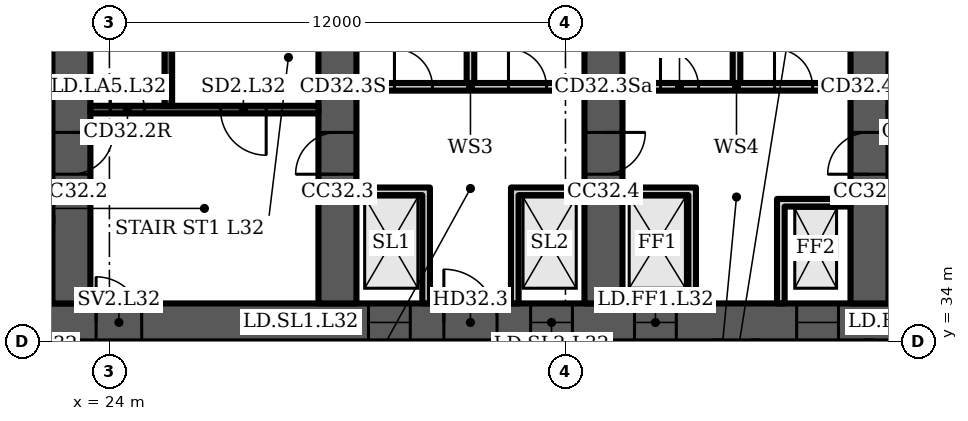
"""IFC4 building model, lengths in metres.
Left out: names, types, materials, properties, quantities, classifications, styles, units other than length and angle.
Written with IfcOpenShell. Run it as: python <this file> out.ifc"""

import sys

from ifc_helpers import new_model, si_unit, direction, frame, frame_2d, origin, place, context, subcontext, project, spatial, polyline, rectangle, outline, extrude, element, fill, save


model = new_model("IFC4")
c1 = context("Model", 3, precision=1e-05, world=origin(), true_north=direction((0.0, 1.0)))
c2 = subcontext(c1, "Body", "Model", "MODEL_VIEW")
j1 = project(units=[si_unit("LENGTHUNIT", "METRE"), si_unit("PLANEANGLEUNIT", "RADIAN")], contexts=[c1])
p1 = place(None, origin())
s1 = spatial("IfcSite", under=j1, at=p1, CompositionType="ELEMENT")
p2 = place(p1, origin())
s2 = spatial("IfcBuilding", under=s1, at=p2, CompositionType="ELEMENT")
p3 = place(p2, frame((0.0, 0.0, 136.3)))
s3 = spatial("IfcBuildingStorey", under=s2, at=p3, CompositionType="ELEMENT", Elevation=136.3)
p4 = place(p3, frame((16.0, 34.5, 0.0), z_axis=(0.0, 0.0, 1.0), x_axis=(1.0, 0.0, 0.0)))
e1 = element("IfcWall", 1, at=p4, inside=s3, PredefinedType="SHEAR", context=c2, shape_type="SweptSolid", body=[
    extrude(rectangle(XDim=49.0, YDim=1.0, at=frame_2d((24.5, 0.0))), origin(), (0.0, 0.0, 1.0), 3.6),
])
p5 = place(p4, frame((1.2, 0.0, 0.0)))
e2 = element("IfcOpeningElement", 2, at=p5, cuts=e1, PredefinedType="OPENING", context=c2, shape_type="SweptSolid", body=[
    extrude(rectangle(XDim=1.1, YDim=2.1, at=frame_2d((0.55, 1.05))), frame((0.0, 0.51, 0.0), z_axis=(0.0, -1.0, 0.0), x_axis=(1.0, 0.0, 0.0)), (0.0, 0.0, 1.0), 1.02),
])
p6 = place(p4, frame((5.083, 0.0, 0.0)))
e3 = element("IfcOpeningElement", 3, at=p6, cuts=e1, PredefinedType="OPENING", context=c2, shape_type="SweptSolid", body=[
    extrude(rectangle(XDim=1.1, YDim=2.1, at=frame_2d((0.55, 1.05))), frame((0.0, 0.51, 0.0), z_axis=(0.0, -1.0, 0.0), x_axis=(1.0, 0.0, 0.0)), (0.0, 0.0, 1.0), 1.02),
])
p7 = place(p4, frame((2.933, 0.0, 0.0)))
e4 = element("IfcOpeningElement", 4, at=p7, cuts=e1, PredefinedType="OPENING", context=c2, shape_type="SweptSolid", body=[
    extrude(rectangle(XDim=1.4, YDim=2.1, at=frame_2d((0.7, 1.05))), frame((0.0, 0.51, 0.0), z_axis=(0.0, -1.0, 0.0), x_axis=(1.0, 0.0, 0.0)), (0.0, 0.0, 1.0), 1.02),
])
p8 = place(p4, frame((7.65, 0.0, 0.0)))
e5 = element("IfcOpeningElement", 5, at=p8, cuts=e1, PredefinedType="OPENING", context=c2, shape_type="SweptSolid", body=[
    extrude(rectangle(XDim=1.2, YDim=2.1, at=frame_2d((0.6, 1.05))), frame((0.0, 0.51, 0.0), z_axis=(0.0, -1.0, 0.0), x_axis=(1.0, 0.0, 0.0)), (0.0, 0.0, 1.0), 1.02),
])
p9 = place(p4, frame((14.817, 0.0, 0.0)))
e6 = element("IfcOpeningElement", 6, at=p9, cuts=e1, PredefinedType="OPENING", context=c2, shape_type="SweptSolid", body=[
    extrude(rectangle(XDim=1.1, YDim=2.1, at=frame_2d((0.55, 1.05))), frame((0.0, 0.51, 0.0), z_axis=(0.0, -1.0, 0.0), x_axis=(1.0, 0.0, 0.0)), (0.0, 0.0, 1.0), 1.02),
])
p10 = place(p4, frame((19.083, 0.0, 0.0)))
e7 = element("IfcOpeningElement", 7, at=p10, cuts=e1, PredefinedType="OPENING", context=c2, shape_type="SweptSolid", body=[
    extrude(rectangle(XDim=1.1, YDim=2.1, at=frame_2d((0.55, 1.05))), frame((0.0, 0.51, 0.0), z_axis=(0.0, -1.0, 0.0), x_axis=(1.0, 0.0, 0.0)), (0.0, 0.0, 1.0), 1.02),
])
p11 = place(p4, frame((16.8, 0.0, 0.0)))
e8 = element("IfcOpeningElement", 8, at=p11, cuts=e1, PredefinedType="OPENING", context=c2, shape_type="SweptSolid", body=[
    extrude(rectangle(XDim=1.4, YDim=2.1, at=frame_2d((0.7, 1.05))), frame((0.0, 0.51, 0.0), z_axis=(0.0, -1.0, 0.0), x_axis=(1.0, 0.0, 0.0)), (0.0, 0.0, 1.0), 1.02),
])
p12 = place(p4, frame((21.817, 0.0, 0.0)))
e9 = element("IfcOpeningElement", 9, at=p12, cuts=e1, PredefinedType="OPENING", context=c2, shape_type="SweptSolid", body=[
    extrude(rectangle(XDim=1.1, YDim=2.1, at=frame_2d((0.55, 1.05))), frame((0.0, 0.51, 0.0), z_axis=(0.0, -1.0, 0.0), x_axis=(1.0, 0.0, 0.0)), (0.0, 0.0, 1.0), 1.02),
])
p13 = place(p4, frame((26.083, 0.0, 0.0)))
e10 = element("IfcOpeningElement", 10, at=p13, cuts=e1, PredefinedType="OPENING", context=c2, shape_type="SweptSolid", body=[
    extrude(rectangle(XDim=1.1, YDim=2.1, at=frame_2d((0.55, 1.05))), frame((0.0, 0.51, 0.0), z_axis=(0.0, -1.0, 0.0), x_axis=(1.0, 0.0, 0.0)), (0.0, 0.0, 1.0), 1.02),
])
p14 = place(p4, frame((33.15, 0.0, 0.0)))
e11 = element("IfcOpeningElement", 11, at=p14, cuts=e1, PredefinedType="OPENING", context=c2, shape_type="SweptSolid", body=[
    extrude(rectangle(XDim=1.2, YDim=2.1, at=frame_2d((0.6, 1.05))), frame((0.0, 0.51, 0.0), z_axis=(0.0, -1.0, 0.0), x_axis=(1.0, 0.0, 0.0)), (0.0, 0.0, 1.0), 1.02),
])
p15 = place(p4, frame((37.8, 0.0, 0.0)))
e12 = element("IfcOpeningElement", 12, at=p15, cuts=e1, PredefinedType="OPENING", context=c2, shape_type="SweptSolid", body=[
    extrude(rectangle(XDim=1.4, YDim=2.1, at=frame_2d((0.7, 1.05))), frame((0.0, 0.51, 0.0), z_axis=(0.0, -1.0, 0.0), x_axis=(1.0, 0.0, 0.0)), (0.0, 0.0, 1.0), 1.02),
])
p16 = place(p4, frame((42.817, 0.0, 0.0)))
e13 = element("IfcOpeningElement", 13, at=p16, cuts=e1, PredefinedType="OPENING", context=c2, shape_type="SweptSolid", body=[
    extrude(rectangle(XDim=1.1, YDim=2.1, at=frame_2d((0.55, 1.05))), frame((0.0, 0.51, 0.0), z_axis=(0.0, -1.0, 0.0), x_axis=(1.0, 0.0, 0.0)), (0.0, 0.0, 1.0), 1.02),
])
p17 = place(p4, frame((46.7, 0.0, 0.0)))
e14 = element("IfcOpeningElement", 14, at=p17, cuts=e1, PredefinedType="OPENING", context=c2, shape_type="SweptSolid", body=[
    extrude(rectangle(XDim=1.1, YDim=2.1, at=frame_2d((0.55, 1.05))), frame((0.0, 0.51, 0.0), z_axis=(0.0, -1.0, 0.0), x_axis=(1.0, 0.0, 0.0)), (0.0, 0.0, 1.0), 1.02),
])
p18 = place(p4, frame((44.667, 0.0, 0.0)))
e15 = element("IfcOpeningElement", 15, at=p18, cuts=e1, PredefinedType="OPENING", context=c2, shape_type="SweptSolid", body=[
    extrude(rectangle(XDim=1.4, YDim=2.1, at=frame_2d((0.7, 1.05))), frame((0.0, 0.51, 0.0), z_axis=(0.0, -1.0, 0.0), x_axis=(1.0, 0.0, 0.0)), (0.0, 0.0, 1.0), 1.02),
])
p19 = place(p3, frame((23.0, 35.0, 0.0), z_axis=(0.0, 0.0, 1.0), x_axis=(0.0, 1.0, 0.0)))
e16 = element("IfcWall", 16, at=p19, inside=s3, PredefinedType="SHEAR", context=c2, shape_type="SweptSolid", body=[
    extrude(rectangle(XDim=13.352, YDim=1.0, at=frame_2d((6.676, 0.0))), origin(), (0.0, 0.0, 1.0), 3.6),
])
p20 = place(p19, frame((10.426, 0.0, 0.0)))
e17 = element("IfcOpeningElement", 17, at=p20, cuts=e16, PredefinedType="OPENING", context=c2, shape_type="SweptSolid", body=[
    extrude(rectangle(XDim=1.0, YDim=2.1, at=frame_2d((0.5, 1.05))), frame((0.0, 0.51, 0.0), z_axis=(0.0, -1.0, 0.0), x_axis=(1.0, 0.0, 0.0)), (0.0, 0.0, 1.0), 1.02),
])
p21 = place(p19, frame((3.4, 0.0, 0.0)))
e18 = element("IfcOpeningElement", 18, at=p21, cuts=e16, PredefinedType="OPENING", context=c2, shape_type="SweptSolid", body=[
    extrude(rectangle(XDim=1.1, YDim=2.1, at=frame_2d((0.55, 1.05))), frame((0.0, 0.51, 0.0), z_axis=(0.0, -1.0, 0.0), x_axis=(1.0, 0.0, 0.0)), (0.0, 0.0, 1.0), 1.02),
])
p22 = place(p3, frame((30.0, 35.0, 0.0), z_axis=(0.0, 0.0, 1.0), x_axis=(0.0, 1.0, 0.0)))
e19 = element("IfcWall", 19, at=p22, inside=s3, PredefinedType="SHEAR", context=c2, shape_type="SweptSolid", body=[
    extrude(rectangle(XDim=13.965, YDim=1.0, at=frame_2d((6.982, 0.0))), origin(), (0.0, 0.0, 1.0), 3.6),
])
p23 = place(p22, frame((3.4, 0.0, 0.0)))
e20 = element("IfcOpeningElement", 20, at=p23, cuts=e19, PredefinedType="OPENING", context=c2, shape_type="SweptSolid", body=[
    extrude(rectangle(XDim=1.1, YDim=2.1, at=frame_2d((0.55, 1.05))), frame((0.0, 0.51, 0.0), z_axis=(0.0, -1.0, 0.0), x_axis=(1.0, 0.0, 0.0)), (0.0, 0.0, 1.0), 1.02),
])
p24 = place(p3, frame((37.0, 35.0, 0.0), z_axis=(0.0, 0.0, 1.0), x_axis=(0.0, 1.0, 0.0)))
e21 = element("IfcWall", 21, at=p24, inside=s3, PredefinedType="SHEAR", context=c2, shape_type="SweptSolid", body=[
    extrude(rectangle(XDim=14.577, YDim=1.0, at=frame_2d((7.289, 0.0))), origin(), (0.0, 0.0, 1.0), 3.6),
])
p25 = place(p24, frame((3.4, 0.0, 0.0)))
e22 = element("IfcOpeningElement", 22, at=p25, cuts=e21, PredefinedType="OPENING", context=c2, shape_type="SweptSolid", body=[
    extrude(rectangle(XDim=1.1, YDim=2.1, at=frame_2d((0.55, 1.05))), frame((0.0, 0.51, 0.0), z_axis=(0.0, -1.0, 0.0), x_axis=(1.0, 0.0, 0.0)), (0.0, 0.0, 1.0), 1.02),
])
p26 = place(p24, frame((9.8, 0.0, 0.0)))
e23 = element("IfcOpeningElement", 23, at=p26, cuts=e21, PredefinedType="OPENING", context=c2, shape_type="SweptSolid", body=[
    extrude(rectangle(XDim=1.0, YDim=2.1, at=frame_2d((0.5, 1.05))), frame((0.0, 0.51, 0.0), z_axis=(0.0, -1.0, 0.0), x_axis=(1.0, 0.0, 0.0)), (0.0, 0.0, 1.0), 1.02),
])
p27 = place(p3, frame((44.0, 35.0, 0.0), z_axis=(0.0, 0.0, 1.0), x_axis=(0.0, 1.0, 0.0)))
e24 = element("IfcWall", 24, at=p27, inside=s3, PredefinedType="SHEAR", context=c2, shape_type="SweptSolid", body=[
    extrude(rectangle(XDim=14.577, YDim=1.0, at=frame_2d((7.289, 0.0))), origin(), (0.0, 0.0, 1.0), 3.6),
])
p28 = place(p27, frame((3.4, 0.0, 0.0)))
e25 = element("IfcOpeningElement", 25, at=p28, cuts=e24, PredefinedType="OPENING", context=c2, shape_type="SweptSolid", body=[
    extrude(rectangle(XDim=1.1, YDim=2.1, at=frame_2d((0.55, 1.05))), frame((0.0, 0.51, 0.0), z_axis=(0.0, -1.0, 0.0), x_axis=(1.0, 0.0, 0.0)), (0.0, 0.0, 1.0), 1.02),
])
p29 = place(p27, frame((9.8, 0.0, 0.0)))
e26 = element("IfcOpeningElement", 26, at=p29, cuts=e24, PredefinedType="OPENING", context=c2, shape_type="SweptSolid", body=[
    extrude(rectangle(XDim=1.0, YDim=2.1, at=frame_2d((0.5, 1.05))), frame((0.0, 0.51, 0.0), z_axis=(0.0, -1.0, 0.0), x_axis=(1.0, 0.0, 0.0)), (0.0, 0.0, 1.0), 1.02),
])
p30 = place(p3, frame((23.5, 40.1, 0.0), z_axis=(0.0, 0.0, 1.0), x_axis=(1.0, 0.0, 0.0)))
e27 = element("IfcWall", 27, at=p30, inside=s3, PredefinedType="SHEAR", context=c2, shape_type="SweptSolid", body=[
    extrude(rectangle(XDim=6.0, YDim=0.2, at=frame_2d((3.0, 0.0))), origin(), (0.0, 0.0, 1.0), 3.2),
])
p31 = place(p30, frame((3.425, 0.0, 0.0)))
e28 = element("IfcOpeningElement", 28, at=p31, cuts=e27, PredefinedType="OPENING", context=c2, shape_type="SweptSolid", body=[
    extrude(rectangle(XDim=1.2, YDim=2.1, at=frame_2d((0.6, 1.05))), frame((0.0, 0.11, 0.0), z_axis=(0.0, -1.0, 0.0), x_axis=(1.0, 0.0, 0.0)), (0.0, 0.0, 1.0), 0.22),
])
p32 = place(p30, frame((0.525, 0.0, 0.0)))
e29 = element("IfcOpeningElement", 29, at=p32, cuts=e27, PredefinedType="OPENING", context=c2, shape_type="SweptSolid", body=[
    extrude(rectangle(XDim=0.9, YDim=2.1, at=frame_2d((0.45, 1.05))), frame((0.0, 0.11, 0.0), z_axis=(0.0, -1.0, 0.0), x_axis=(1.0, 0.0, 0.0)), (0.0, 0.0, 1.0), 0.22),
])
p33 = place(p3, frame((25.55, 40.2, 0.0), z_axis=(0.0, 0.0, 1.0), x_axis=(0.0, 1.0, 0.0)))
e30 = element("IfcWall", 30, at=p33, inside=s3, PredefinedType="SHEAR", context=c2, shape_type="SweptSolid", body=[
    extrude(rectangle(XDim=7.2, YDim=0.2, at=frame_2d((3.6, 0.0))), origin(), (0.0, 0.0, 1.0), 3.2),
])
p34 = place(p3, frame((30.5, 40.7, 0.0), z_axis=(0.0, 0.0, 1.0), x_axis=(1.0, 0.0, 0.0)))
e31 = element("IfcWall", 31, at=p34, inside=s3, PredefinedType="PARTITIONING", context=c2, shape_type="SweptSolid", body=[
    extrude(rectangle(XDim=6.0, YDim=0.2, at=frame_2d((3.0, 0.0))), origin(), (0.0, 0.0, 1.0), 3.2),
])
p35 = place(p34, frame((1.0, 0.0, 0.0)))
e32 = element("IfcOpeningElement", 32, at=p35, cuts=e31, PredefinedType="OPENING", context=c2, shape_type="SweptSolid", body=[
    extrude(rectangle(XDim=1.0, YDim=2.1, at=frame_2d((0.5, 1.05))), frame((0.0, 0.11, 0.0), z_axis=(0.0, -1.0, 0.0), x_axis=(1.0, 0.0, 0.0)), (0.0, 0.0, 1.0), 0.22),
])
p36 = place(p34, frame((4.0, 0.0, 0.0)))
e33 = element("IfcOpeningElement", 33, at=p36, cuts=e31, PredefinedType="OPENING", context=c2, shape_type="SweptSolid", body=[
    extrude(rectangle(XDim=1.0, YDim=2.1, at=frame_2d((0.5, 1.05))), frame((0.0, 0.11, 0.0), z_axis=(0.0, -1.0, 0.0), x_axis=(1.0, 0.0, 0.0)), (0.0, 0.0, 1.0), 0.22),
])
p37 = place(p3, frame((0.0, 0.0, -0.0)))
e34 = element("IfcWall", 34, at=p37, inside=s3, PredefinedType="PARTITIONING", context=c2, shape_type="SweptSolid", body=[
    extrude(outline(polyline([(32.233, 37.85), (30.5, 37.85), (30.5, 38.05), (32.233, 38.05), (32.433, 38.05), (32.433, 35.0), (32.233, 35.0), (32.233, 37.85)])), origin(), (0.0, 0.0, 1.0), 3.2),
])
p38 = place(p3, frame((0.0, 0.0, -0.0)))
e35 = element("IfcWall", 35, at=p38, inside=s3, PredefinedType="PARTITIONING", context=c2, shape_type="SweptSolid", body=[
    extrude(outline(polyline([(34.567, 38.05), (34.767, 38.05), (36.5, 38.05), (36.5, 37.85), (34.767, 37.85), (34.767, 35.0), (34.567, 35.0), (34.567, 38.05)])), origin(), (0.0, 0.0, 1.0), 3.2),
])
p39 = place(p3, frame((33.5, 40.8, 0.0), z_axis=(0.0, 0.0, 1.0), x_axis=(0.0, 1.0, 0.0)))
e36 = element("IfcWall", 36, at=p39, inside=s3, PredefinedType="PARTITIONING", context=c2, shape_type="SweptSolid", body=[
    extrude(rectangle(XDim=8.232, YDim=0.2, at=frame_2d((4.116, 0.0))), origin(), (0.0, 0.0, 1.0), 3.2),
])
p40 = place(p3, frame((37.5, 40.7, 0.0), z_axis=(0.0, 0.0, 1.0), x_axis=(1.0, 0.0, 0.0)))
e37 = element("IfcWall", 37, at=p40, inside=s3, PredefinedType="PARTITIONING", context=c2, shape_type="SweptSolid", body=[
    extrude(rectangle(XDim=6.0, YDim=0.2, at=frame_2d((3.0, 0.0))), origin(), (0.0, 0.0, 1.0), 3.2),
])
p41 = place(p40, frame((1.0, 0.0, 0.0)))
e38 = element("IfcOpeningElement", 38, at=p41, cuts=e37, PredefinedType="OPENING", context=c2, shape_type="SweptSolid", body=[
    extrude(rectangle(XDim=1.0, YDim=2.1, at=frame_2d((0.5, 1.05))), frame((0.0, 0.11, 0.0), z_axis=(0.0, -1.0, 0.0), x_axis=(1.0, 0.0, 0.0)), (0.0, 0.0, 1.0), 0.22),
])
p42 = place(p40, frame((4.0, 0.0, 0.0)))
e39 = element("IfcOpeningElement", 39, at=p42, cuts=e37, PredefinedType="OPENING", context=c2, shape_type="SweptSolid", body=[
    extrude(rectangle(XDim=1.0, YDim=2.1, at=frame_2d((0.5, 1.05))), frame((0.0, 0.11, 0.0), z_axis=(0.0, -1.0, 0.0), x_axis=(1.0, 0.0, 0.0)), (0.0, 0.0, 1.0), 0.22),
])
p43 = place(p3, frame((0.0, 0.0, -0.0)))
e40 = element("IfcWall", 40, at=p43, inside=s3, PredefinedType="PARTITIONING", context=c2, shape_type="SweptSolid", body=[
    extrude(outline(polyline([(41.567, 37.75), (41.767, 37.75), (43.5, 37.75), (43.5, 37.55), (41.767, 37.55), (41.767, 35.0), (41.567, 35.0), (41.567, 37.75)])), origin(), (0.0, 0.0, 1.0), 3.2),
])
p44 = place(p3, frame((0.0, 0.0, -0.0)))
e41 = element("IfcWall", 41, at=p44, inside=s3, PredefinedType="PARTITIONING", context=c2, shape_type="SweptSolid", body=[
    extrude(outline(polyline([(39.233, 37.85), (37.5, 37.85), (37.5, 38.05), (39.233, 38.05), (39.433, 38.05), (39.433, 35.0), (39.233, 35.0), (39.233, 37.85)])), origin(), (0.0, 0.0, 1.0), 3.2),
])
p45 = place(p3, frame((40.5, 40.8, 0.0), z_axis=(0.0, 0.0, 1.0), x_axis=(0.0, 1.0, 0.0)))
e42 = element("IfcWall", 42, at=p45, inside=s3, PredefinedType="PARTITIONING", context=c2, shape_type="SweptSolid", body=[
    extrude(rectangle(XDim=8.844, YDim=0.2, at=frame_2d((4.422, 0.0))), origin(), (0.0, 0.0, 1.0), 3.2),
])
p46 = place(p31, origin())
e43 = element("IfcDoor", 43, at=p46, inside=s3, OperationType="SINGLE_SWING_RIGHT", PredefinedType="DOOR", context=c2, shape_type="SweptSolid", body=[
    extrude(rectangle(XDim=1.2, YDim=2.1, at=frame_2d((0.6, 1.05))), frame((0.0, 0.025, 0.0), z_axis=(0.0, -1.0, 0.0), x_axis=(1.0, 0.0, 0.0)), (0.0, 0.0, 1.0), 0.05),
])
fill(e28, e43)
p47 = place(p32, origin())
e44 = element("IfcDoor", 44, at=p47, inside=s3, OperationType="SINGLE_SWING_LEFT", PredefinedType="DOOR", context=c2, shape_type="SweptSolid", body=[
    extrude(rectangle(XDim=0.9, YDim=2.1, at=frame_2d((0.45, 1.05))), frame((0.0, 0.025, 0.0), z_axis=(0.0, -1.0, 0.0), x_axis=(1.0, 0.0, 0.0)), (0.0, 0.0, 1.0), 0.05),
])
fill(e29, e44)
p48 = place(p8, origin())
e45 = element("IfcDoor", 45, at=p48, inside=s3, OperationType="SINGLE_SWING_LEFT", PredefinedType="DOOR", context=c2, shape_type="SweptSolid", body=[
    extrude(rectangle(XDim=1.2, YDim=2.1, at=frame_2d((0.6, 1.05))), frame((0.0, 0.025, 0.0), z_axis=(0.0, -1.0, 0.0), x_axis=(1.0, 0.0, 0.0)), (0.0, 0.0, 1.0), 0.05),
])
fill(e5, e45)
p49 = place(p9, origin())
e46 = element("IfcDoor", 46, at=p49, inside=s3, OperationType="DOUBLE_DOOR_SLIDING", PredefinedType="DOOR", context=c2, shape_type="SweptSolid", body=[
    extrude(rectangle(XDim=1.1, YDim=2.1, at=frame_2d((0.55, 1.05))), frame((0.0, 0.025, 0.0), z_axis=(0.0, -1.0, 0.0), x_axis=(1.0, 0.0, 0.0)), (0.0, 0.0, 1.0), 0.05),
])
fill(e6, e46)
p50 = place(p10, origin())
e47 = element("IfcDoor", 47, at=p50, inside=s3, OperationType="DOUBLE_DOOR_SLIDING", PredefinedType="DOOR", context=c2, shape_type="SweptSolid", body=[
    extrude(rectangle(XDim=1.1, YDim=2.1, at=frame_2d((0.55, 1.05))), frame((0.0, 0.025, 0.0), z_axis=(0.0, -1.0, 0.0), x_axis=(1.0, 0.0, 0.0)), (0.0, 0.0, 1.0), 0.05),
])
fill(e7, e47)
p51 = place(p11, origin())
e48 = element("IfcDoor", 48, at=p51, inside=s3, OperationType="DOUBLE_DOOR_SINGLE_SWING", PredefinedType="DOOR", context=c2, shape_type="SweptSolid", body=[
    extrude(rectangle(XDim=1.4, YDim=2.1, at=frame_2d((0.7, 1.05))), frame((0.0, 0.025, 0.0), z_axis=(0.0, -1.0, 0.0), x_axis=(1.0, 0.0, 0.0)), (0.0, 0.0, 1.0), 0.05),
])
fill(e8, e48)
p52 = place(p35, origin())
e49 = element("IfcDoor", 49, at=p52, inside=s3, OperationType="SINGLE_SWING_LEFT", PredefinedType="DOOR", context=c2, shape_type="SweptSolid", body=[
    extrude(rectangle(XDim=1.0, YDim=2.1, at=frame_2d((0.5, 1.05))), frame((0.0, 0.025, 0.0), z_axis=(0.0, -1.0, 0.0), x_axis=(1.0, 0.0, 0.0)), (0.0, 0.0, 1.0), 0.05),
])
fill(e32, e49)
p53 = place(p36, origin())
e50 = element("IfcDoor", 50, at=p53, inside=s3, OperationType="SINGLE_SWING_LEFT", PredefinedType="DOOR", context=c2, shape_type="SweptSolid", body=[
    extrude(rectangle(XDim=1.0, YDim=2.1, at=frame_2d((0.5, 1.05))), frame((0.0, 0.025, 0.0), z_axis=(0.0, -1.0, 0.0), x_axis=(1.0, 0.0, 0.0)), (0.0, 0.0, 1.0), 0.05),
])
fill(e33, e50)
p54 = place(p12, origin())
e51 = element("IfcDoor", 51, at=p54, inside=s3, OperationType="DOUBLE_DOOR_SLIDING", PredefinedType="DOOR", context=c2, shape_type="SweptSolid", body=[
    extrude(rectangle(XDim=1.1, YDim=2.1, at=frame_2d((0.55, 1.05))), frame((0.0, 0.025, 0.0), z_axis=(0.0, -1.0, 0.0), x_axis=(1.0, 0.0, 0.0)), (0.0, 0.0, 1.0), 0.05),
])
fill(e9, e51)
p55 = place(p13, origin())
e52 = element("IfcDoor", 52, at=p55, inside=s3, OperationType="DOUBLE_DOOR_SLIDING", PredefinedType="DOOR", context=c2, shape_type="SweptSolid", body=[
    extrude(rectangle(XDim=1.1, YDim=2.1, at=frame_2d((0.55, 1.05))), frame((0.0, 0.025, 0.0), z_axis=(0.0, -1.0, 0.0), x_axis=(1.0, 0.0, 0.0)), (0.0, 0.0, 1.0), 0.05),
])
fill(e10, e52)
p56 = place(p41, origin())
e53 = element("IfcDoor", 53, at=p56, inside=s3, OperationType="SINGLE_SWING_LEFT", PredefinedType="DOOR", context=c2, shape_type="SweptSolid", body=[
    extrude(rectangle(XDim=1.0, YDim=2.1, at=frame_2d((0.5, 1.05))), frame((0.0, 0.025, 0.0), z_axis=(0.0, -1.0, 0.0), x_axis=(1.0, 0.0, 0.0)), (0.0, 0.0, 1.0), 0.05),
])
fill(e38, e53)
p57 = place(p42, origin())
e54 = element("IfcDoor", 54, at=p57, inside=s3, OperationType="SINGLE_SWING_LEFT", PredefinedType="DOOR", context=c2, shape_type="SweptSolid", body=[
    extrude(rectangle(XDim=1.0, YDim=2.1, at=frame_2d((0.5, 1.05))), frame((0.0, 0.025, 0.0), z_axis=(0.0, -1.0, 0.0), x_axis=(1.0, 0.0, 0.0)), (0.0, 0.0, 1.0), 0.05),
])
fill(e39, e54)
p58 = place(p21, origin())
e55 = element("IfcDoor", 55, at=p58, inside=s3, OperationType="SINGLE_SWING_RIGHT", PredefinedType="DOOR", context=c2, shape_type="SweptSolid", body=[
    extrude(rectangle(XDim=1.1, YDim=2.1, at=frame_2d((0.55, 1.05))), frame((0.0, 0.025, 0.0), z_axis=(0.0, -1.0, 0.0), x_axis=(1.0, 0.0, 0.0)), (0.0, 0.0, 1.0), 0.05),
])
fill(e18, e55)
p59 = place(p23, origin())
e56 = element("IfcDoor", 56, at=p59, inside=s3, OperationType="SINGLE_SWING_LEFT", PredefinedType="DOOR", context=c2, shape_type="SweptSolid", body=[
    extrude(rectangle(XDim=1.1, YDim=2.1, at=frame_2d((0.55, 1.05))), frame((0.0, 0.025, 0.0), z_axis=(0.0, -1.0, 0.0), x_axis=(1.0, 0.0, 0.0)), (0.0, 0.0, 1.0), 0.05),
])
fill(e20, e56)
p60 = place(p25, origin())
e57 = element("IfcDoor", 57, at=p60, inside=s3, OperationType="SINGLE_SWING_RIGHT", PredefinedType="DOOR", context=c2, shape_type="SweptSolid", body=[
    extrude(rectangle(XDim=1.1, YDim=2.1, at=frame_2d((0.55, 1.05))), frame((0.0, 0.025, 0.0), z_axis=(0.0, -1.0, 0.0), x_axis=(1.0, 0.0, 0.0)), (0.0, 0.0, 1.0), 0.05),
])
fill(e22, e57)
p61 = place(p28, origin())
e58 = element("IfcDoor", 58, at=p61, inside=s3, OperationType="SINGLE_SWING_LEFT", PredefinedType="DOOR", context=c2, shape_type="SweptSolid", body=[
    extrude(rectangle(XDim=1.1, YDim=2.1, at=frame_2d((0.55, 1.05))), frame((0.0, 0.025, 0.0), z_axis=(0.0, -1.0, 0.0), x_axis=(1.0, 0.0, 0.0)), (0.0, 0.0, 1.0), 0.05),
])
fill(e25, e58)
save(model, sys.argv[1])
